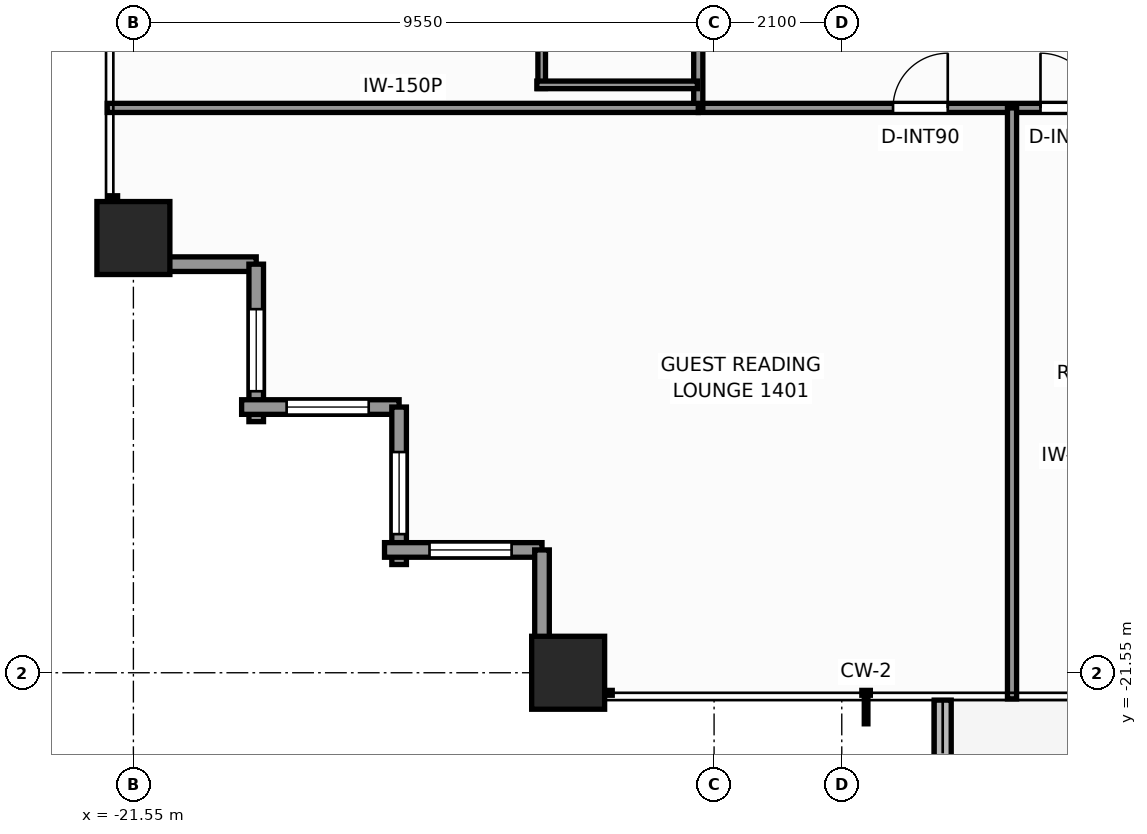
"""IFC4 building model, lengths in metres.
Left out: names, types, materials, properties, quantities, classifications, styles, units other than length and angle.
Written with IfcOpenShell. Run it as: python <this file> out.ifc"""

import sys

from ifc_helpers import new_model, si_unit, direction, frame, frame_2d, origin, origin_2d, place, context, subcontext, project, spatial, rectangle, extrude, element, fill, save


model = new_model("IFC4")
c1 = context("Model", 3, precision=1e-05, world=origin(), true_north=direction((0.0, 1.0)))
c2 = subcontext(c1, "Body", "Model", "MODEL_VIEW")
j1 = project(units=[si_unit("LENGTHUNIT", "METRE"), si_unit("PLANEANGLEUNIT", "RADIAN")], contexts=[c1])
p1 = place(None, origin())
s1 = spatial("IfcSite", under=j1, at=p1, CompositionType="ELEMENT")
p2 = place(p1, origin())
s2 = spatial("IfcBuilding", under=s1, at=p2, CompositionType="ELEMENT")
p3 = place(p2, frame((0.0, 0.0, 50.2)))
s3 = spatial("IfcBuildingStorey", under=s2, at=p3, CompositionType="ELEMENT", Elevation=50.2)
for number, where, z_axis, x_axis in (
    (1, (-14.4, -21.55, 0.0), (0.0, 0.0, 1.0), (1.0, 0.0, 0.0)),
    (2, (-21.55, -14.4, 0.0), (0.0, 0.0, 1.0), (1.0, 0.0, 0.0)),
):
    element("IfcColumn", number, at=place(p3, frame(where, z_axis=z_axis, x_axis=x_axis)), inside=s3, PredefinedType="COLUMN", context=c2, shape_type="SweptSolid", body=[
        extrude(rectangle(XDim=1.2, YDim=1.2, at=origin_2d()), origin(), (0.0, 0.0, 1.0), 3.3),
    ])
p4 = place(p3, frame((-8.24, -22.0, -0.06), z_axis=(0.0, 0.0, 1.0), x_axis=(0.0, -1.0, 0.0)))
e3 = element("IfcWall", 3, at=p4, inside=s3, PredefinedType="PARAPET", context=c2, shape_type="SweptSolid", body=[
    extrude(rectangle(XDim=2.674, YDim=0.28, at=frame_2d((1.337, 0.0))), origin(), (0.0, 0.0, 1.0), 0.42),
])
p5 = place(p3, frame((-19.53, -14.83, 0.0), z_axis=(0.0, 0.0, 1.0), x_axis=(-1.0, 0.0, 0.0)))
e4 = element("IfcWall", 4, at=p5, inside=s3, PredefinedType="STANDARD", context=c2, shape_type="SweptSolid", body=[
    extrude(rectangle(XDim=2.59, YDim=0.24, at=frame_2d((1.295, 0.0))), origin(), (0.0, 0.0, 1.0), 2.439),
])
p6 = place(p3, frame((-19.53, -17.42, 0.0), z_axis=(0.0, 0.0, 1.0), x_axis=(0.0, 1.0, 0.0)))
e5 = element("IfcWall", 5, at=p6, inside=s3, PredefinedType="STANDARD", context=c2, shape_type="SweptSolid", body=[
    extrude(rectangle(XDim=2.59, YDim=0.24, at=frame_2d((1.295, 0.0))), origin(), (0.0, 0.0, 1.0), 2.439),
])
p7 = place(p6, frame((0.5, 0.0, 0.65)))
e6 = element("IfcOpeningElement", 6, at=p7, cuts=e5, PredefinedType="OPENING", context=c2, shape_type="SweptSolid", body=[
    extrude(rectangle(XDim=1.35, YDim=1.55, at=frame_2d((0.675, 0.775))), frame((0.0, 0.13, 0.0), z_axis=(0.0, -1.0, 0.0), x_axis=(1.0, 0.0, 0.0)), (0.0, 0.0, 1.0), 0.26),
])
p8 = place(p3, frame((-17.18, -17.18, 0.0), z_axis=(0.0, 0.0, 1.0), x_axis=(-1.0, 0.0, 0.0)))
e7 = element("IfcWall", 7, at=p8, inside=s3, PredefinedType="STANDARD", context=c2, shape_type="SweptSolid", body=[
    extrude(rectangle(XDim=2.59, YDim=0.24, at=frame_2d((1.295, 0.0))), origin(), (0.0, 0.0, 1.0), 2.439),
])
p9 = place(p8, frame((0.5, 0.0, 0.65)))
e8 = element("IfcOpeningElement", 8, at=p9, cuts=e7, PredefinedType="OPENING", context=c2, shape_type="SweptSolid", body=[
    extrude(rectangle(XDim=1.35, YDim=1.55, at=frame_2d((0.675, 0.775))), frame((0.0, 0.13, 0.0), z_axis=(0.0, -1.0, 0.0), x_axis=(1.0, 0.0, 0.0)), (0.0, 0.0, 1.0), 0.26),
])
p10 = place(p3, frame((-17.18, -19.77, 0.0), z_axis=(0.0, 0.0, 1.0), x_axis=(0.0, 1.0, 0.0)))
e9 = element("IfcWall", 9, at=p10, inside=s3, PredefinedType="STANDARD", context=c2, shape_type="SweptSolid", body=[
    extrude(rectangle(XDim=2.59, YDim=0.24, at=frame_2d((1.295, 0.0))), origin(), (0.0, 0.0, 1.0), 2.439),
])
p11 = place(p10, frame((0.5, 0.0, 0.65)))
e10 = element("IfcOpeningElement", 10, at=p11, cuts=e9, PredefinedType="OPENING", context=c2, shape_type="SweptSolid", body=[
    extrude(rectangle(XDim=1.35, YDim=1.55, at=frame_2d((0.675, 0.775))), frame((0.0, 0.13, 0.0), z_axis=(0.0, -1.0, 0.0), x_axis=(1.0, 0.0, 0.0)), (0.0, 0.0, 1.0), 0.26),
])
p12 = place(p3, frame((-14.83, -19.53, 0.0), z_axis=(0.0, 0.0, 1.0), x_axis=(-1.0, 0.0, 0.0)))
e11 = element("IfcWall", 11, at=p12, inside=s3, PredefinedType="STANDARD", context=c2, shape_type="SweptSolid", body=[
    extrude(rectangle(XDim=2.59, YDim=0.24, at=frame_2d((1.295, 0.0))), origin(), (0.0, 0.0, 1.0), 2.439),
])
p13 = place(p12, frame((0.5, 0.0, 0.65)))
e12 = element("IfcOpeningElement", 12, at=p13, cuts=e11, PredefinedType="OPENING", context=c2, shape_type="SweptSolid", body=[
    extrude(rectangle(XDim=1.35, YDim=1.55, at=frame_2d((0.675, 0.775))), frame((0.0, 0.13, 0.0), z_axis=(0.0, -1.0, 0.0), x_axis=(1.0, 0.0, 0.0)), (0.0, 0.0, 1.0), 0.26),
])
p14 = place(p3, frame((-14.83, -22.12, 0.0), z_axis=(0.0, 0.0, 1.0), x_axis=(0.0, 1.0, 0.0)))
e13 = element("IfcWall", 13, at=p14, inside=s3, PredefinedType="STANDARD", context=c2, shape_type="SweptSolid", body=[
    extrude(rectangle(XDim=2.59, YDim=0.24, at=frame_2d((1.295, 0.0))), origin(), (0.0, 0.0, 1.0), 2.439),
])
p15 = place(p3, frame((-12.26, -12.26, 0.0), z_axis=(0.0, 0.0, 1.0), x_axis=(1.0, 0.0, 0.0)))
e14 = element("IfcWall", 14, at=p15, inside=s3, PredefinedType="PARTITIONING", context=c2, shape_type="SweptSolid", body=[
    extrude(rectangle(XDim=24.84, YDim=0.15, at=frame_2d((12.42, 0.0))), origin(), (0.0, 0.0, 1.0), 2.272),
])
p16 = place(p15, frame((3.203, 0.0, 0.0)))
e15 = element("IfcOpeningElement", 15, at=p16, cuts=e14, PredefinedType="OPENING", context=c2, shape_type="SweptSolid", body=[
    extrude(rectangle(XDim=0.9, YDim=2.06, at=frame_2d((0.45, 1.03))), frame((0.0, 0.085, 0.0), z_axis=(0.0, -1.0, 0.0), x_axis=(1.0, 0.0, 0.0)), (0.0, 0.0, 1.0), 0.17),
])
p17 = place(p15, frame((5.628, 0.0, 0.0)))
e16 = element("IfcOpeningElement", 16, at=p17, cuts=e14, PredefinedType="OPENING", context=c2, shape_type="SweptSolid", body=[
    extrude(rectangle(XDim=0.9, YDim=2.06, at=frame_2d((0.45, 1.03))), frame((0.0, 0.085, 0.0), z_axis=(0.0, -1.0, 0.0), x_axis=(1.0, 0.0, 0.0)), (0.0, 0.0, 1.0), 0.17),
])
p18 = place(p15, frame((8.611, 0.0, 0.0)))
e17 = element("IfcOpeningElement", 17, at=p18, cuts=e14, PredefinedType="OPENING", context=c2, shape_type="SweptSolid", body=[
    extrude(rectangle(XDim=0.95, YDim=2.06, at=frame_2d((0.475, 1.03))), frame((0.0, 0.085, 0.0), z_axis=(0.0, -1.0, 0.0), x_axis=(1.0, 0.0, 0.0)), (0.0, 0.0, 1.0), 0.17),
])
p19 = place(p15, frame((13.84, 0.0, 0.0)))
e18 = element("IfcOpeningElement", 18, at=p19, cuts=e14, PredefinedType="OPENING", context=c2, shape_type="SweptSolid", body=[
    extrude(rectangle(XDim=0.9, YDim=2.06, at=frame_2d((0.45, 1.03))), frame((0.0, 0.085, 0.0), z_axis=(0.0, -1.0, 0.0), x_axis=(1.0, 0.0, 0.0)), (0.0, 0.0, 1.0), 0.17),
])
p20 = place(p15, frame((19.542, 0.0, 0.0)))
e19 = element("IfcOpeningElement", 19, at=p20, cuts=e14, PredefinedType="OPENING", context=c2, shape_type="SweptSolid", body=[
    extrude(rectangle(XDim=0.9, YDim=2.06, at=frame_2d((0.45, 1.03))), frame((0.0, 0.085, 0.0), z_axis=(0.0, -1.0, 0.0), x_axis=(1.0, 0.0, 0.0)), (0.0, 0.0, 1.0), 0.17),
])
p21 = place(p3, frame((-12.26, -12.26, 0.0), z_axis=(0.0, 0.0, 1.0), x_axis=(0.0, 1.0, 0.0)))
e20 = element("IfcWall", 20, at=p21, inside=s3, PredefinedType="PARTITIONING", context=c2, shape_type="SweptSolid", body=[
    extrude(rectangle(XDim=24.84, YDim=0.15, at=frame_2d((12.42, 0.0))), origin(), (0.0, 0.0, 1.0), 2.272),
])
p22 = place(p21, frame((3.448, 0.0, 0.0)))
e21 = element("IfcOpeningElement", 21, at=p22, cuts=e20, PredefinedType="OPENING", context=c2, shape_type="SweptSolid", body=[
    extrude(rectangle(XDim=0.95, YDim=2.06, at=frame_2d((0.475, 1.03))), frame((0.0, 0.085, 0.0), z_axis=(0.0, -1.0, 0.0), x_axis=(1.0, 0.0, 0.0)), (0.0, 0.0, 1.0), 0.17),
])
p23 = place(p21, frame((9.218, 0.0, 0.0)))
e22 = element("IfcOpeningElement", 22, at=p23, cuts=e20, PredefinedType="OPENING", context=c2, shape_type="SweptSolid", body=[
    extrude(rectangle(XDim=0.95, YDim=2.06, at=frame_2d((0.475, 1.03))), frame((0.0, 0.085, 0.0), z_axis=(0.0, -1.0, 0.0), x_axis=(1.0, 0.0, 0.0)), (0.0, 0.0, 1.0), 0.17),
])
p24 = place(p21, frame((14.558, 0.0, 0.0)))
e23 = element("IfcOpeningElement", 23, at=p24, cuts=e20, PredefinedType="OPENING", context=c2, shape_type="SweptSolid", body=[
    extrude(rectangle(XDim=0.95, YDim=2.06, at=frame_2d((0.475, 1.03))), frame((0.0, 0.085, 0.0), z_axis=(0.0, -1.0, 0.0), x_axis=(1.0, 0.0, 0.0)), (0.0, 0.0, 1.0), 0.17),
])
p25 = place(p21, frame((20.852, 0.0, 0.0)))
e24 = element("IfcOpeningElement", 24, at=p25, cuts=e20, PredefinedType="OPENING", context=c2, shape_type="SweptSolid", body=[
    extrude(rectangle(XDim=0.95, YDim=2.06, at=frame_2d((0.475, 1.03))), frame((0.0, 0.085, 0.0), z_axis=(0.0, -1.0, 0.0), x_axis=(1.0, 0.0, 0.0)), (0.0, 0.0, 1.0), 0.17),
])
p26 = place(p3, frame((-21.98, -12.26, 0.0), z_axis=(0.0, 0.0, 1.0), x_axis=(1.0, 0.0, 0.0)))
e25 = element("IfcWall", 25, at=p26, inside=s3, PredefinedType="PARTITIONING", context=c2, shape_type="SweptSolid", body=[
    extrude(rectangle(XDim=9.72, YDim=0.15, at=frame_2d((4.86, 0.0))), origin(), (0.0, 0.0, 1.0), 2.272),
])
p27 = place(p3, frame((-7.1, -21.98, 0.0), z_axis=(0.0, 0.0, 1.0), x_axis=(0.0, 1.0, 0.0)))
e26 = element("IfcWall", 26, at=p27, inside=s3, PredefinedType="PARTITIONING", context=c2, shape_type="SweptSolid", body=[
    extrude(rectangle(XDim=9.72, YDim=0.15, at=frame_2d((4.86, 0.0))), origin(), (0.0, 0.0, 1.0), 2.429),
])
p28 = place(p3, frame((-14.835, -11.941, 0.0), z_axis=(0.0, 0.0, 1.0), x_axis=(0.0, 1.0, 0.0)))
e27 = element("IfcWall", 27, at=p28, inside=s3, PredefinedType="PARTITIONING", context=c2, shape_type="SweptSolid", body=[
    extrude(rectangle(XDim=2.52, YDim=0.125, at=frame_2d((1.26, 0.0))), origin(), (0.0, 0.0, 1.0), 2.272),
])
p29 = place(p3, frame((-14.915, -11.881, 0.0), z_axis=(0.0, 0.0, 1.0), x_axis=(1.0, 0.0, 0.0)))
e28 = element("IfcWall", 28, at=p29, inside=s3, PredefinedType="PARTITIONING", context=c2, shape_type="SweptSolid", body=[
    extrude(rectangle(XDim=2.64, YDim=0.125, at=frame_2d((1.32, 0.0))), origin(), (0.0, 0.0, 1.0), 2.272),
])
p30 = place(p7, origin())
e29 = element("IfcWindow", 29, at=p30, inside=s3, PartitioningType="SINGLE_PANEL", PredefinedType="WINDOW", context=c2, shape_type="SweptSolid", body=[
    extrude(rectangle(XDim=1.35, YDim=1.55, at=frame_2d((0.675, 0.775))), frame((0.0, 0.03, 0.0), z_axis=(0.0, -1.0, 0.0), x_axis=(1.0, 0.0, 0.0)), (0.0, 0.0, 1.0), 0.06),
])
fill(e6, e29)
p31 = place(p9, origin())
e30 = element("IfcWindow", 30, at=p31, inside=s3, PartitioningType="SINGLE_PANEL", PredefinedType="WINDOW", context=c2, shape_type="SweptSolid", body=[
    extrude(rectangle(XDim=1.35, YDim=1.55, at=frame_2d((0.675, 0.775))), frame((0.0, 0.03, 0.0), z_axis=(0.0, -1.0, 0.0), x_axis=(1.0, 0.0, 0.0)), (0.0, 0.0, 1.0), 0.06),
])
fill(e8, e30)
p32 = place(p11, origin())
e31 = element("IfcWindow", 31, at=p32, inside=s3, PartitioningType="SINGLE_PANEL", PredefinedType="WINDOW", context=c2, shape_type="SweptSolid", body=[
    extrude(rectangle(XDim=1.35, YDim=1.55, at=frame_2d((0.675, 0.775))), frame((0.0, 0.03, 0.0), z_axis=(0.0, -1.0, 0.0), x_axis=(1.0, 0.0, 0.0)), (0.0, 0.0, 1.0), 0.06),
])
fill(e10, e31)
p33 = place(p13, origin())
e32 = element("IfcWindow", 32, at=p33, inside=s3, PartitioningType="SINGLE_PANEL", PredefinedType="WINDOW", context=c2, shape_type="SweptSolid", body=[
    extrude(rectangle(XDim=1.35, YDim=1.55, at=frame_2d((0.675, 0.775))), frame((0.0, 0.03, 0.0), z_axis=(0.0, -1.0, 0.0), x_axis=(1.0, 0.0, 0.0)), (0.0, 0.0, 1.0), 0.06),
])
fill(e12, e32)
p34 = place(p16, origin())
e33 = element("IfcDoor", 33, at=p34, inside=s3, OperationType="SINGLE_SWING_RIGHT", PredefinedType="DOOR", context=c2, shape_type="SweptSolid", body=[
    extrude(rectangle(XDim=0.9, YDim=2.06, at=frame_2d((0.45, 1.03))), frame((0.0, 0.025, 0.0), z_axis=(0.0, -1.0, 0.0), x_axis=(1.0, 0.0, 0.0)), (0.0, 0.0, 1.0), 0.05),
])
fill(e15, e33)
p35 = place(p17, origin())
e34 = element("IfcDoor", 34, at=p35, inside=s3, OperationType="SINGLE_SWING_LEFT", PredefinedType="DOOR", context=c2, shape_type="SweptSolid", body=[
    extrude(rectangle(XDim=0.9, YDim=2.06, at=frame_2d((0.45, 1.03))), frame((0.0, 0.025, 0.0), z_axis=(0.0, -1.0, 0.0), x_axis=(1.0, 0.0, 0.0)), (0.0, 0.0, 1.0), 0.05),
])
fill(e16, e34)
save(model, sys.argv[1])
